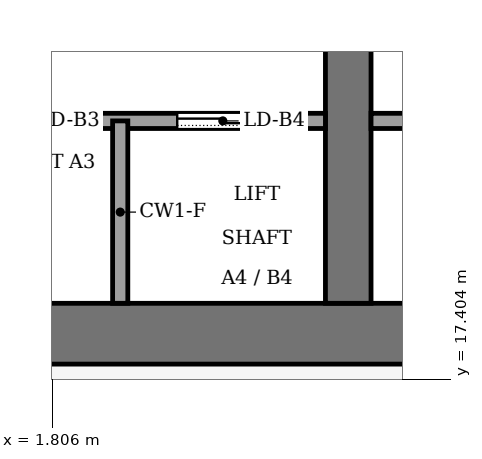
"""IFC4 building model, lengths in metres.
Left out: names, types, materials, properties, quantities, classifications, styles, units other than length and angle.
Written with IfcOpenShell. Run it as: python <this file> out.ifc"""

import sys

from ifc_helpers import new_model, si_unit, direction, frame, frame_2d, origin, place, context, subcontext, project, spatial, rectangle, extrude, element, fill, save


model = new_model("IFC4")
c1 = context("Model", 3, precision=1e-05, world=origin(), true_north=direction((0.0, 1.0)))
c2 = subcontext(c1, "Body", "Model", "MODEL_VIEW")
j1 = project(units=[si_unit("LENGTHUNIT", "METRE"), si_unit("PLANEANGLEUNIT", "RADIAN")], contexts=[c1])
p1 = place(None, origin())
s1 = spatial("IfcSite", under=j1, at=p1, CompositionType="ELEMENT")
p2 = place(p1, origin())
s2 = spatial("IfcBuilding", under=s1, at=p2, CompositionType="ELEMENT")
p3 = place(p2, frame((0.0, 0.0, 238.0)))
s3 = spatial("IfcBuildingStorey", under=s2, at=p3, CompositionType="ELEMENT", Elevation=238.0)
p4 = place(p3, frame((-13.4, 18.0, -0.13), z_axis=(0.0, 0.0, 1.0), x_axis=(1.0, 0.0, 0.0)))
e1 = element("IfcWall", 1, at=p4, inside=s3, PredefinedType="SHEAR", context=c2, shape_type="SweptSolid", body=[
    extrude(rectangle(XDim=26.8, YDim=0.8, at=frame_2d((13.4, 0.0))), origin(), (0.0, 0.0, 1.0), 4.0),
])
p5 = place(p3, frame((5.7, 18.4, -0.13), z_axis=(0.0, 0.0, 1.0), x_axis=(0.0, 1.0, 0.0)))
e2 = element("IfcWall", 2, at=p5, inside=s3, PredefinedType="SHEAR", context=c2, shape_type="SweptSolid", body=[
    extrude(rectangle(XDim=19.2, YDim=0.6, at=frame_2d((9.6, 0.0))), origin(), (0.0, 0.0, 1.0), 4.0),
])
p6 = place(p5, frame((13.3, 0.0, 0.13)))
e3 = element("IfcOpeningElement", 3, at=p6, cuts=e2, PredefinedType="OPENING", context=c2, shape_type="SweptSolid", body=[
    extrude(rectangle(XDim=2.4, YDim=2.4, at=frame_2d((1.2, 1.2))), frame((0.0, 0.31, 0.0), z_axis=(0.0, -1.0, 0.0), x_axis=(1.0, 0.0, 0.0)), (0.0, 0.0, 1.0), 0.62),
])
p7 = place(p3, frame((-5.4, 20.8, 0.0), z_axis=(0.0, 0.0, 1.0), x_axis=(1.0, 0.0, 0.0)))
e4 = element("IfcWall", 4, at=p7, inside=s3, PredefinedType="PARTITIONING", context=c2, shape_type="SweptSolid", body=[
    extrude(rectangle(XDim=10.8, YDim=0.2, at=frame_2d((5.4, 0.0))), origin(), (0.0, 0.0, 1.0), 3.87),
])
p8 = place(p7, frame((0.75, 0.0, 0.0)))
e5 = element("IfcOpeningElement", 5, at=p8, cuts=e4, PredefinedType="OPENING", context=c2, shape_type="SweptSolid", body=[
    extrude(rectangle(XDim=1.2, YDim=2.2, at=frame_2d((0.6, 1.1))), frame((0.0, 0.11, 0.0), z_axis=(0.0, -1.0, 0.0), x_axis=(1.0, 0.0, 0.0)), (0.0, 0.0, 1.0), 0.22),
])
p9 = place(p7, frame((3.45, 0.0, 0.0)))
e6 = element("IfcOpeningElement", 6, at=p9, cuts=e4, PredefinedType="OPENING", context=c2, shape_type="SweptSolid", body=[
    extrude(rectangle(XDim=1.2, YDim=2.2, at=frame_2d((0.6, 1.1))), frame((0.0, 0.11, 0.0), z_axis=(0.0, -1.0, 0.0), x_axis=(1.0, 0.0, 0.0)), (0.0, 0.0, 1.0), 0.22),
])
p10 = place(p7, frame((6.15, 0.0, 0.0)))
e7 = element("IfcOpeningElement", 7, at=p10, cuts=e4, PredefinedType="OPENING", context=c2, shape_type="SweptSolid", body=[
    extrude(rectangle(XDim=1.2, YDim=2.2, at=frame_2d((0.6, 1.1))), frame((0.0, 0.11, 0.0), z_axis=(0.0, -1.0, 0.0), x_axis=(1.0, 0.0, 0.0)), (0.0, 0.0, 1.0), 0.22),
])
p11 = place(p7, frame((8.85, 0.0, 0.0)))
e8 = element("IfcOpeningElement", 8, at=p11, cuts=e4, PredefinedType="OPENING", context=c2, shape_type="SweptSolid", body=[
    extrude(rectangle(XDim=1.2, YDim=2.2, at=frame_2d((0.6, 1.1))), frame((0.0, 0.11, 0.0), z_axis=(0.0, -1.0, 0.0), x_axis=(1.0, 0.0, 0.0)), (0.0, 0.0, 1.0), 0.22),
])
p12 = place(p3, frame((6.0, 20.8, 0.0), z_axis=(0.0, 0.0, 1.0), x_axis=(1.0, 0.0, 0.0)))
e9 = element("IfcWall", 9, at=p12, inside=s3, PredefinedType="PARTITIONING", context=c2, shape_type="SweptSolid", body=[
    extrude(rectangle(XDim=6.6, YDim=0.2, at=frame_2d((3.3, 0.0))), origin(), (0.0, 0.0, 1.0), 3.87),
])
p13 = place(p12, frame((2.8, 0.0, 0.0)))
e10 = element("IfcOpeningElement", 10, at=p13, cuts=e9, PredefinedType="OPENING", context=c2, shape_type="SweptSolid", body=[
    extrude(rectangle(XDim=1.0, YDim=2.1, at=frame_2d((0.5, 1.05))), frame((0.0, 0.11, 0.0), z_axis=(0.0, -1.0, 0.0), x_axis=(1.0, 0.0, 0.0)), (0.0, 0.0, 1.0), 0.22),
])
p14 = place(p3, frame((2.7, 18.4, 0.0), z_axis=(0.0, 0.0, 1.0), x_axis=(0.0, 1.0, 0.0)))
e11 = element("IfcWall", 11, at=p14, inside=s3, PredefinedType="PARTITIONING", context=c2, shape_type="SweptSolid", body=[
    extrude(rectangle(XDim=2.4, YDim=0.2, at=frame_2d((1.2, 0.0))), origin(), (0.0, 0.0, 1.0), 3.87),
])
p15 = place(p10, origin())
e12 = element("IfcDoor", 12, at=p15, inside=s3, OperationType="SLIDING_TO_LEFT", PredefinedType="DOOR", context=c2, shape_type="SweptSolid", body=[
    extrude(rectangle(XDim=1.2, YDim=2.2, at=frame_2d((0.6, 1.1))), frame((0.0, 0.025, 0.0), z_axis=(0.0, -1.0, 0.0), x_axis=(1.0, 0.0, 0.0)), (0.0, 0.0, 1.0), 0.05),
])
fill(e7, e12)
p16 = place(p11, origin())
e13 = element("IfcDoor", 13, at=p16, inside=s3, OperationType="SLIDING_TO_LEFT", PredefinedType="DOOR", context=c2, shape_type="SweptSolid", body=[
    extrude(rectangle(XDim=1.2, YDim=2.2, at=frame_2d((0.6, 1.1))), frame((0.0, 0.025, 0.0), z_axis=(0.0, -1.0, 0.0), x_axis=(1.0, 0.0, 0.0)), (0.0, 0.0, 1.0), 0.05),
])
fill(e8, e13)
save(model, sys.argv[1])
